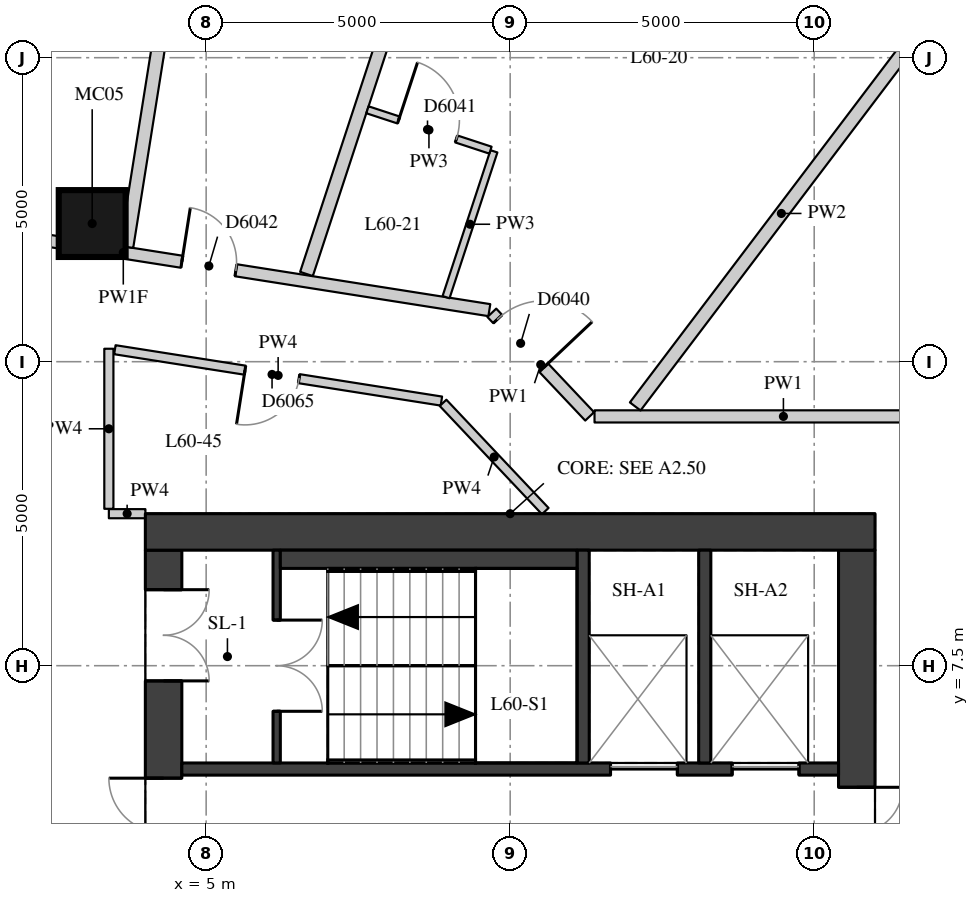
"""IFC4 building model, lengths in metres.
Left out: names, types, materials, properties, quantities, classifications, styles, units other than length and angle.
Written with IfcOpenShell. Run it as: python <this file> out.ifc"""

import sys

from ifc_helpers import new_model, si_unit, direction, frame, frame_2d, origin, origin_2d, place, context, subcontext, project, spatial, rectangle, extrude, element, fill, save


model = new_model("IFC4")
c1 = context("Model", 3, precision=1e-05, world=origin(), true_north=direction((0.0, 1.0)))
c2 = subcontext(c1, "Body", "Model", "MODEL_VIEW")
j1 = project(units=[si_unit("LENGTHUNIT", "METRE"), si_unit("PLANEANGLEUNIT", "RADIAN")], contexts=[c1])
p1 = place(None, origin())
s1 = spatial("IfcSite", under=j1, at=p1, CompositionType="ELEMENT")
p2 = place(p1, origin())
s2 = spatial("IfcBuilding", under=s1, at=p2, CompositionType="ELEMENT")
p3 = place(p2, frame((0.0, 0.0, 212.3)))
s3 = spatial("IfcBuildingStorey", under=s2, at=p3, CompositionType="ELEMENT", Elevation=212.3)
p4 = place(p3, frame((3.126, 14.772, 0.0), z_axis=(0.0, 0.0, 1.0), x_axis=(1.0, 0.0, 0.0)))
e1 = element("IfcColumn", 1, at=p4, inside=s3, PredefinedType="COLUMN", context=c2, shape_type="SweptSolid", body=[
    extrude(rectangle(XDim=1.1, YDim=1.1, at=origin_2d()), origin(), (0.0, 0.0, 1.0), 3.3),
])
p5 = place(p3, frame((4.3, -9.4, 0.0), z_axis=(0.0, 0.0, 1.0), x_axis=(0.0, 1.0, 0.0)))
e2 = element("IfcWall", 2, at=p5, inside=s3, PredefinedType="SHEAR", context=c2, shape_type="SweptSolid", body=[
    extrude(rectangle(XDim=18.8, YDim=0.6, at=frame_2d((9.4, 0.0))), origin(), (0.0, 0.0, 1.0), 3.02),
])
p6 = place(p5, frame((0.65, 0.0, 0.0)))
e3 = element("IfcOpeningElement", 3, at=p6, cuts=e2, PredefinedType="OPENING", context=c2, shape_type="SweptSolid", body=[
    extrude(rectangle(XDim=1.5, YDim=2.1, at=frame_2d((0.75, 1.05))), frame((0.0, 0.31, 0.0), z_axis=(0.0, -1.0, 0.0), x_axis=(1.0, 0.0, 0.0)), (0.0, 0.0, 1.0), 0.62),
])
p7 = place(p5, frame((3.75, 0.0, 0.0)))
e4 = element("IfcOpeningElement", 4, at=p7, cuts=e2, PredefinedType="OPENING", context=c2, shape_type="SweptSolid", body=[
    extrude(rectangle(XDim=1.8, YDim=2.1, at=frame_2d((0.9, 1.05))), frame((0.0, 0.31, 0.0), z_axis=(0.0, -1.0, 0.0), x_axis=(1.0, 0.0, 0.0)), (0.0, 0.0, 1.0), 0.62),
])
p8 = place(p5, frame((6.25, 0.0, 0.0)))
e5 = element("IfcOpeningElement", 5, at=p8, cuts=e2, PredefinedType="OPENING", context=c2, shape_type="SweptSolid", body=[
    extrude(rectangle(XDim=1.1, YDim=2.1, at=frame_2d((0.55, 1.05))), frame((0.0, 0.31, 0.0), z_axis=(0.0, -1.0, 0.0), x_axis=(1.0, 0.0, 0.0)), (0.0, 0.0, 1.0), 0.62),
])
p9 = place(p5, frame((8.9, 0.0, 0.0)))
e6 = element("IfcOpeningElement", 6, at=p9, cuts=e2, PredefinedType="OPENING", context=c2, shape_type="SweptSolid", body=[
    extrude(rectangle(XDim=1.0, YDim=2.1, at=frame_2d((0.5, 1.05))), frame((0.0, 0.31, 0.0), z_axis=(0.0, -1.0, 0.0), x_axis=(1.0, 0.0, 0.0)), (0.0, 0.0, 1.0), 0.62),
])
p10 = place(p5, frame((11.45, 0.0, 0.0)))
e7 = element("IfcOpeningElement", 7, at=p10, cuts=e2, PredefinedType="OPENING", context=c2, shape_type="SweptSolid", body=[
    extrude(rectangle(XDim=1.1, YDim=2.1, at=frame_2d((0.55, 1.05))), frame((0.0, 0.31, 0.0), z_axis=(0.0, -1.0, 0.0), x_axis=(1.0, 0.0, 0.0)), (0.0, 0.0, 1.0), 0.62),
])
p11 = place(p5, frame((13.25, 0.0, 0.0)))
e8 = element("IfcOpeningElement", 8, at=p11, cuts=e2, PredefinedType="OPENING", context=c2, shape_type="SweptSolid", body=[
    extrude(rectangle(XDim=1.8, YDim=2.1, at=frame_2d((0.9, 1.05))), frame((0.0, 0.31, 0.0), z_axis=(0.0, -1.0, 0.0), x_axis=(1.0, 0.0, 0.0)), (0.0, 0.0, 1.0), 0.62),
])
p12 = place(p5, frame((16.65, 0.0, 0.0)))
e9 = element("IfcOpeningElement", 9, at=p12, cuts=e2, PredefinedType="OPENING", context=c2, shape_type="SweptSolid", body=[
    extrude(rectangle(XDim=1.5, YDim=2.1, at=frame_2d((0.75, 1.05))), frame((0.0, 0.31, 0.0), z_axis=(0.0, -1.0, 0.0), x_axis=(1.0, 0.0, 0.0)), (0.0, 0.0, 1.0), 0.62),
])
p13 = place(p3, frame((15.7, -9.4, 0.0), z_axis=(0.0, 0.0, 1.0), x_axis=(0.0, 1.0, 0.0)))
e10 = element("IfcWall", 10, at=p13, inside=s3, PredefinedType="SHEAR", context=c2, shape_type="SweptSolid", body=[
    extrude(rectangle(XDim=18.8, YDim=0.6, at=frame_2d((9.4, 0.0))), origin(), (0.0, 0.0, 1.0), 3.02),
])
p14 = place(p13, frame((13.4, 0.0, 0.0)))
e11 = element("IfcOpeningElement", 11, at=p14, cuts=e10, PredefinedType="OPENING", context=c2, shape_type="SweptSolid", body=[
    extrude(rectangle(XDim=1.5, YDim=2.1, at=frame_2d((0.75, 1.05))), frame((0.0, 0.31, 0.0), z_axis=(0.0, -1.0, 0.0), x_axis=(1.0, 0.0, 0.0)), (0.0, 0.0, 1.0), 0.62),
])
p15 = place(p13, frame((3.9, 0.0, 0.0)))
e12 = element("IfcOpeningElement", 12, at=p15, cuts=e10, PredefinedType="OPENING", context=c2, shape_type="SweptSolid", body=[
    extrude(rectangle(XDim=1.5, YDim=2.1, at=frame_2d((0.75, 1.05))), frame((0.0, 0.31, 0.0), z_axis=(0.0, -1.0, 0.0), x_axis=(1.0, 0.0, 0.0)), (0.0, 0.0, 1.0), 0.62),
])
p16 = place(p3, frame((4.0, 9.7, 0.0), z_axis=(0.0, 0.0, 1.0), x_axis=(1.0, 0.0, 0.0)))
e13 = element("IfcWall", 13, at=p16, inside=s3, PredefinedType="SHEAR", context=c2, shape_type="SweptSolid", body=[
    extrude(rectangle(XDim=12.0, YDim=0.6, at=frame_2d((6.0, 0.0))), origin(), (0.0, 0.0, 1.0), 3.02),
])
p17 = place(p3, frame((4.6, 5.8, 0.0), z_axis=(0.0, 0.0, 1.0), x_axis=(1.0, 0.0, 0.0)))
e14 = element("IfcWall", 14, at=p17, inside=s3, PredefinedType="SHEAR", context=c2, shape_type="SweptSolid", body=[
    extrude(rectangle(XDim=10.8, YDim=0.2, at=frame_2d((5.4, 0.0))), origin(), (0.0, 0.0, 1.0), 3.02),
])
p18 = place(p17, frame((7.05, 0.0, 0.0)))
e15 = element("IfcOpeningElement", 15, at=p18, cuts=e14, PredefinedType="OPENING", context=c2, shape_type="SweptSolid", body=[
    extrude(rectangle(XDim=1.1, YDim=2.1, at=frame_2d((0.55, 1.05))), frame((0.0, 0.11, 0.0), z_axis=(0.0, -1.0, 0.0), x_axis=(1.0, 0.0, 0.0)), (0.0, 0.0, 1.0), 0.22),
])
p19 = place(p17, frame((9.05, 0.0, 0.0)))
e16 = element("IfcOpeningElement", 16, at=p19, cuts=e14, PredefinedType="OPENING", context=c2, shape_type="SweptSolid", body=[
    extrude(rectangle(XDim=1.1, YDim=2.1, at=frame_2d((0.55, 1.05))), frame((0.0, 0.11, 0.0), z_axis=(0.0, -1.0, 0.0), x_axis=(1.0, 0.0, 0.0)), (0.0, 0.0, 1.0), 0.22),
])
for number, where, z_axis, x_axis in (
    (17, (11.2, 5.9, 0.0), (0.0, 0.0, 1.0), (0.0, 1.0, 0.0)),
    (18, (13.2, 5.9, 0.0), (0.0, 0.0, 1.0), (0.0, 1.0, 0.0)),
):
    element("IfcWall", number, at=place(p3, frame(where, z_axis=z_axis, x_axis=x_axis)), inside=s3, PredefinedType="SHEAR", context=c2, shape_type="SweptSolid", body=[
        extrude(rectangle(XDim=3.5, YDim=0.2, at=frame_2d((1.75, 0.0))), origin(), (0.0, 0.0, 1.0), 3.02),
    ])
p20 = place(p3, frame((6.16, 5.9, 0.0), z_axis=(0.0, 0.0, 1.0), x_axis=(0.0, 1.0, 0.0)))
e19 = element("IfcWall", 19, at=p20, inside=s3, PredefinedType="SHEAR", context=c2, shape_type="SweptSolid", body=[
    extrude(rectangle(XDim=3.5, YDim=0.12, at=frame_2d((1.75, 0.0))), origin(), (0.0, 0.0, 1.0), 3.02),
])
p21 = place(p20, frame((0.85, 0.0, 0.0)))
e20 = element("IfcOpeningElement", 20, at=p21, cuts=e19, PredefinedType="OPENING", context=c2, shape_type="SweptSolid", body=[
    extrude(rectangle(XDim=1.5, YDim=2.1, at=frame_2d((0.75, 1.05))), frame((0.0, 0.07, 0.0), z_axis=(0.0, -1.0, 0.0), x_axis=(1.0, 0.0, 0.0)), (0.0, 0.0, 1.0), 0.14),
])
p22 = place(p3, frame((6.22, 9.25, 0.0), z_axis=(0.0, 0.0, 1.0), x_axis=(1.0, 0.0, 0.0)))
e21 = element("IfcWall", 21, at=p22, inside=s3, PredefinedType="PARTITIONING", context=c2, shape_type="SweptSolid", body=[
    extrude(rectangle(XDim=4.88, YDim=0.3, at=frame_2d((2.44, 0.0))), origin(), (0.0, 0.0, 1.0), 3.02),
])
p23 = place(p3, frame((-2.383, 15.243, 0.0), z_axis=(0.0, 0.0, 1.0), x_axis=(0.987842256944, -0.15545956193, 0.0)))
e22 = element("IfcWall", 22, at=p23, inside=s3, PredefinedType="PARTITIONING", context=c2, shape_type="SweptSolid", body=[
    extrude(rectangle(XDim=12.188, YDim=0.2, at=frame_2d((6.094, 0.0))), origin(), (0.0, 0.0, 1.0), 2.42),
])
p24 = place(p23, frame((7.069, 0.0, 0.0)))
e23 = element("IfcOpeningElement", 23, at=p24, cuts=e22, PredefinedType="OPENING", context=c2, shape_type="SweptSolid", body=[
    extrude(rectangle(XDim=0.9, YDim=2.1, at=frame_2d((0.45, 1.05))), frame((0.0, 0.11, 0.0), z_axis=(0.0, -1.0, 0.0), x_axis=(1.0, 0.0, 0.0)), (0.0, 0.0, 1.0), 0.22),
])
p25 = place(p23, frame((3.676, 0.0, 0.0)))
e24 = element("IfcOpeningElement", 24, at=p25, cuts=e22, PredefinedType="OPENING", context=c2, shape_type="SweptSolid", body=[
    extrude(rectangle(XDim=0.9, YDim=2.1, at=frame_2d((0.45, 1.05))), frame((0.0, 0.11, 0.0), z_axis=(0.0, -1.0, 0.0), x_axis=(1.0, 0.0, 0.0)), (0.0, 0.0, 1.0), 0.22),
])
p26 = place(p23, frame((1.875, 0.0, 0.0)))
e25 = element("IfcOpeningElement", 25, at=p26, cuts=e22, PredefinedType="OPENING", context=c2, shape_type="SweptSolid", body=[
    extrude(rectangle(XDim=0.9, YDim=2.1, at=frame_2d((0.45, 1.05))), frame((0.0, 0.11, 0.0), z_axis=(0.0, -1.0, 0.0), x_axis=(1.0, 0.0, 0.0)), (0.0, 0.0, 1.0), 0.22),
])
p27 = place(p3, frame((9.698, 13.304, 0.0), z_axis=(0.0, 0.0, 1.0), x_axis=(0.686553169295, -0.727079600684, 0.0)))
e26 = element("IfcWall", 26, at=p27, inside=s3, PredefinedType="PARTITIONING", context=c2, shape_type="SweptSolid", body=[
    extrude(rectangle(XDim=2.344, YDim=0.2, at=frame_2d((1.172, 0.0))), origin(), (0.0, 0.0, 1.0), 3.02),
])
p28 = place(p27, frame((0.14, 0.0, 0.0)))
e27 = element("IfcOpeningElement", 27, at=p28, cuts=e26, PredefinedType="OPENING", context=c2, shape_type="SweptSolid", body=[
    extrude(rectangle(XDim=1.1, YDim=2.1, at=frame_2d((0.55, 1.05))), frame((0.0, 0.11, 0.0), z_axis=(0.0, -1.0, 0.0), x_axis=(1.0, 0.0, 0.0)), (0.0, 0.0, 1.0), 0.22),
])
p29 = place(p3, frame((11.387, 11.6, 0.0), z_axis=(0.0, 0.0, 1.0), x_axis=(1.0, 0.0, 0.0)))
e28 = element("IfcWall", 28, at=p29, inside=s3, PredefinedType="PARTITIONING", context=c2, shape_type="SweptSolid", body=[
    extrude(rectangle(XDim=6.213, YDim=0.2, at=frame_2d((3.106, 0.0))), origin(), (0.0, 0.0, 1.0), 3.02),
])
p30 = place(p3, frame((4.001, 10.0, 0.0), z_axis=(0.0, 0.0, 1.0), x_axis=(-1.0, 0.0, 0.0)))
e29 = element("IfcWall", 29, at=p30, inside=s3, PredefinedType="PARTITIONING", context=c2, shape_type="SweptSolid", body=[
    extrude(rectangle(XDim=0.601, YDim=0.15, at=frame_2d((0.301, 0.0))), origin(), (0.0, 0.0, 1.0), 3.02),
])
p31 = place(p3, frame((3.4, 10.08, 0.0), z_axis=(0.0, 0.0, 1.0), x_axis=(0.0, 1.0, 0.0)))
e30 = element("IfcWall", 30, at=p31, inside=s3, PredefinedType="PARTITIONING", context=c2, shape_type="SweptSolid", body=[
    extrude(rectangle(XDim=2.633, YDim=0.15, at=frame_2d((1.316, 0.0))), origin(), (0.0, 0.0, 1.0), 3.02),
])
p32 = place(p3, frame((3.499, 12.697, 0.0), z_axis=(0.0, 0.0, 1.0), x_axis=(0.987853106423, -0.155390605029, 0.0)))
e31 = element("IfcWall", 31, at=p32, inside=s3, PredefinedType="PARTITIONING", context=c2, shape_type="SweptSolid", body=[
    extrude(rectangle(XDim=5.436, YDim=0.15, at=frame_2d((2.718, 0.0))), origin(), (0.0, 0.0, 1.0), 3.02),
])
p33 = place(p32, frame((2.167, 0.0, 0.0)))
e32 = element("IfcOpeningElement", 32, at=p33, cuts=e31, PredefinedType="OPENING", context=c2, shape_type="SweptSolid", body=[
    extrude(rectangle(XDim=0.9, YDim=2.1, at=frame_2d((0.45, 1.05))), frame((0.0, 0.085, 0.0), z_axis=(0.0, -1.0, 0.0), x_axis=(1.0, 0.0, 0.0)), (0.0, 0.0, 1.0), 0.17),
])
p34 = place(p3, frame((8.896, 11.823, 0.0), z_axis=(0.0, 0.0, 1.0), x_axis=(0.686471254033, -0.727156941373, 0.0)))
e33 = element("IfcWall", 33, at=p34, inside=s3, PredefinedType="PARTITIONING", context=c2, shape_type="SweptSolid", body=[
    extrude(rectangle(XDim=2.448, YDim=0.15, at=frame_2d((1.224, 0.0))), origin(), (0.0, 0.0, 1.0), 3.02),
])
p35 = place(p3, frame((16.863, 18.113, 0.0), z_axis=(0.0, 0.0, 1.0), x_axis=(-0.603628639054, -0.797265618294, 0.0)))
e34 = element("IfcWall", 34, at=p35, inside=s3, PredefinedType="PARTITIONING", context=c2, shape_type="SweptSolid", body=[
    extrude(rectangle(XDim=7.963, YDim=0.22, at=frame_2d((3.982, 0.0))), origin(), (0.0, 0.0, 1.0), 3.02),
])
p36 = place(p3, frame((9.307, 22.035, 0.0), z_axis=(0.0, 0.0, 1.0), x_axis=(-0.311959631661, -0.950095357432, 0.0)))
e35 = element("IfcWall", 35, at=p36, inside=s3, PredefinedType="PARTITIONING", context=c2, shape_type="SweptSolid", body=[
    extrude(rectangle(XDim=8.518, YDim=0.22, at=frame_2d((4.259, 0.0))), origin(), (0.0, 0.0, 1.0), 3.02),
])
p37 = place(p3, frame((5.071, 23.056, 0.0), z_axis=(0.0, 0.0, 1.0), x_axis=(-0.157127996446, -0.987578246385, 0.0)))
e36 = element("IfcWall", 36, at=p37, inside=s3, PredefinedType="PARTITIONING", context=c2, shape_type="SweptSolid", body=[
    extrude(rectangle(XDim=8.777, YDim=0.22, at=frame_2d((4.389, 0.0))), origin(), (0.0, 0.0, 1.0), 2.47),
])
p38 = place(p3, frame((8.945, 13.561, 0.0), z_axis=(0.0, 0.0, 1.0), x_axis=(0.311960021399, 0.950095229463, 0.0)))
e37 = element("IfcWall", 37, at=p38, inside=s3, PredefinedType="PARTITIONING", context=c2, shape_type="SweptSolid", body=[
    extrude(rectangle(XDim=2.525, YDim=0.12, at=frame_2d((1.262, 0.0))), origin(), (0.0, 0.0, 1.0), 3.02),
])
p39 = place(p3, frame((9.676, 15.979, 0.0), z_axis=(0.0, 0.0, 1.0), x_axis=(-0.950106513103, 0.311925654217, 0.0)))
e38 = element("IfcWall", 38, at=p39, inside=s3, PredefinedType="PARTITIONING", context=c2, shape_type="SweptSolid", body=[
    extrude(rectangle(XDim=2.13, YDim=0.12, at=frame_2d((1.065, 0.0))), origin(), (0.0, 0.0, 1.0), 3.02),
])
p40 = place(p39, frame((0.59, 0.0, 0.0)))
e39 = element("IfcOpeningElement", 39, at=p40, cuts=e38, PredefinedType="OPENING", context=c2, shape_type="SweptSolid", body=[
    extrude(rectangle(XDim=1.0, YDim=2.1, at=frame_2d((0.5, 1.05))), frame((0.0, 0.07, 0.0), z_axis=(0.0, -1.0, 0.0), x_axis=(1.0, 0.0, 0.0)), (0.0, 0.0, 1.0), 0.14),
])
p41 = place(p11, origin())
e40 = element("IfcDoor", 40, at=p41, inside=s3, OperationType="DOUBLE_DOOR_SINGLE_SWING", PredefinedType="DOOR", context=c2, shape_type="SweptSolid", body=[
    extrude(rectangle(XDim=1.8, YDim=2.1, at=frame_2d((0.9, 1.05))), frame((0.0, 0.025, 0.0), z_axis=(0.0, -1.0, 0.0), x_axis=(1.0, 0.0, 0.0)), (0.0, 0.0, 1.0), 0.05),
])
fill(e8, e40)
p42 = place(p12, origin())
e41 = element("IfcDoor", 41, at=p42, inside=s3, OperationType="DOUBLE_DOOR_SINGLE_SWING", PredefinedType="DOOR", context=c2, shape_type="SweptSolid", body=[
    extrude(rectangle(XDim=1.5, YDim=2.1, at=frame_2d((0.75, 1.05))), frame((0.0, 0.025, 0.0), z_axis=(0.0, -1.0, 0.0), x_axis=(1.0, 0.0, 0.0)), (0.0, 0.0, 1.0), 0.05),
])
fill(e9, e41)
p43 = place(p14, origin())
e42 = element("IfcDoor", 42, at=p43, inside=s3, OperationType="DOUBLE_DOOR_SINGLE_SWING", PredefinedType="DOOR", context=c2, shape_type="SweptSolid", body=[
    extrude(rectangle(XDim=1.5, YDim=2.1, at=frame_2d((0.75, 1.05))), frame((0.0, 0.025, 0.0), z_axis=(0.0, -1.0, 0.0), x_axis=(1.0, 0.0, 0.0)), (0.0, 0.0, 1.0), 0.05),
])
fill(e11, e42)
p44 = place(p21, origin())
e43 = element("IfcDoor", 43, at=p44, inside=s3, OperationType="DOUBLE_DOOR_SINGLE_SWING", PredefinedType="DOOR", context=c2, shape_type="SweptSolid", body=[
    extrude(rectangle(XDim=1.5, YDim=2.1, at=frame_2d((0.75, 1.05))), frame((0.0, 0.025, 0.0), z_axis=(0.0, -1.0, 0.0), x_axis=(1.0, 0.0, 0.0)), (0.0, 0.0, 1.0), 0.05),
])
fill(e20, e43)
p45 = place(p18, origin())
e44 = element("IfcDoor", 44, at=p45, inside=s3, OperationType="DOUBLE_DOOR_SLIDING", PredefinedType="DOOR", context=c2, shape_type="SweptSolid", body=[
    extrude(rectangle(XDim=1.1, YDim=2.1, at=frame_2d((0.55, 1.05))), frame((0.0, 0.025, 0.0), z_axis=(0.0, -1.0, 0.0), x_axis=(1.0, 0.0, 0.0)), (0.0, 0.0, 1.0), 0.05),
])
fill(e15, e44)
p46 = place(p19, origin())
e45 = element("IfcDoor", 45, at=p46, inside=s3, OperationType="DOUBLE_DOOR_SLIDING", PredefinedType="DOOR", context=c2, shape_type="SweptSolid", body=[
    extrude(rectangle(XDim=1.1, YDim=2.1, at=frame_2d((0.55, 1.05))), frame((0.0, 0.025, 0.0), z_axis=(0.0, -1.0, 0.0), x_axis=(1.0, 0.0, 0.0)), (0.0, 0.0, 1.0), 0.05),
])
fill(e16, e45)
p47 = place(p28, origin())
e46 = element("IfcDoor", 46, at=p47, inside=s3, OperationType="SINGLE_SWING_RIGHT", PredefinedType="DOOR", context=c2, shape_type="SweptSolid", body=[
    extrude(rectangle(XDim=1.1, YDim=2.1, at=frame_2d((0.55, 1.05))), frame((0.0, 0.025, 0.0), z_axis=(0.0, -1.0, 0.0), x_axis=(1.0, 0.0, 0.0)), (0.0, 0.0, 1.0), 0.05),
])
fill(e27, e46)
p48 = place(p40, origin())
e47 = element("IfcDoor", 47, at=p48, inside=s3, OperationType="SINGLE_SWING_LEFT", PredefinedType="DOOR", context=c2, shape_type="SweptSolid", body=[
    extrude(rectangle(XDim=1.0, YDim=2.1, at=frame_2d((0.5, 1.05))), frame((0.0, 0.025, 0.0), z_axis=(0.0, -1.0, 0.0), x_axis=(1.0, 0.0, 0.0)), (0.0, 0.0, 1.0), 0.05),
])
fill(e39, e47)
p49 = place(p24, origin())
e48 = element("IfcDoor", 48, at=p49, inside=s3, OperationType="SINGLE_SWING_LEFT", PredefinedType="DOOR", context=c2, shape_type="SweptSolid", body=[
    extrude(rectangle(XDim=0.9, YDim=2.1, at=frame_2d((0.45, 1.05))), frame((0.0, 0.025, 0.0), z_axis=(0.0, -1.0, 0.0), x_axis=(1.0, 0.0, 0.0)), (0.0, 0.0, 1.0), 0.05),
])
fill(e23, e48)
p50 = place(p33, origin())
e49 = element("IfcDoor", 49, at=p50, inside=s3, OperationType="SINGLE_SWING_RIGHT", PredefinedType="DOOR", context=c2, shape_type="SweptSolid", body=[
    extrude(rectangle(XDim=0.9, YDim=2.1, at=frame_2d((0.45, 1.05))), frame((0.0, 0.025, 0.0), z_axis=(0.0, -1.0, 0.0), x_axis=(1.0, 0.0, 0.0)), (0.0, 0.0, 1.0), 0.05),
])
fill(e32, e49)
save(model, sys.argv[1])
